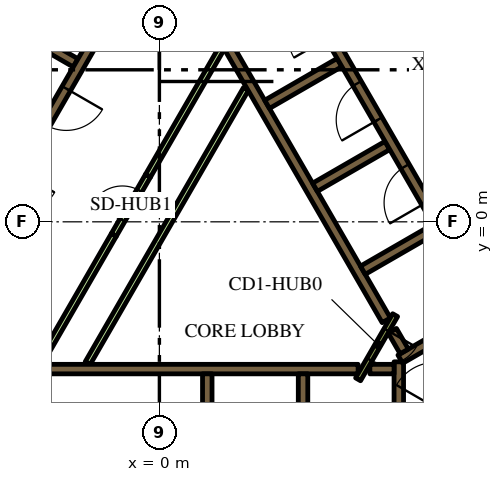
"""IFC4 building model, lengths in metres.
Left out: names, types, materials, properties, quantities, classifications, styles, units other than length and angle.
Written with IfcOpenShell. Run it as: python <this file> out.ifc"""

import sys

from ifc_helpers import new_model, si_unit, direction, frame, frame_2d, origin, place, context, subcontext, project, spatial, rectangle, extrude, element, fill, save


model = new_model("IFC4")
c1 = context("Model", 3, precision=1e-05, world=origin(), true_north=direction((0.0, 1.0)))
c2 = subcontext(c1, "Body", "Model", "MODEL_VIEW")
j1 = project(units=[si_unit("LENGTHUNIT", "METRE"), si_unit("PLANEANGLEUNIT", "RADIAN")], contexts=[c1])
p1 = place(None, origin())
s1 = spatial("IfcSite", under=j1, at=p1, CompositionType="ELEMENT")
p2 = place(p1, origin())
s2 = spatial("IfcBuilding", under=s1, at=p2, CompositionType="ELEMENT")
p3 = place(p2, frame((0.0, 0.0, 296.4)))
s3 = spatial("IfcBuildingStorey", under=s2, at=p3, CompositionType="ELEMENT", Elevation=296.4)
p4 = place(p3, frame((6.3, -7.24, 0.0), z_axis=(0.0, 0.0, 1.0), x_axis=(0.0, 1.0, 0.0)))
e1 = element("IfcWall", 1, at=p4, inside=s3, PredefinedType="SOLIDWALL", context=c2, shape_type="SweptSolid", body=[
    extrude(rectangle(XDim=3.556, YDim=0.25, at=frame_2d((1.778, 0.0))), origin(), (0.0, 0.0, 1.0), 4.2),
])
p5 = place(p3, frame((5.538, -3.875, 0.0), z_axis=(0.0, 0.0, 1.0), x_axis=(1.0, 0.0, 0.0)))
e2 = element("IfcWall", 2, at=p5, inside=s3, PredefinedType="SOLIDWALL", context=c2, shape_type="SweptSolid", body=[
    extrude(rectangle(XDim=0.637, YDim=0.25, at=frame_2d((0.318, 0.0))), origin(), (0.0, 0.0, 1.0), 4.2),
])
p6 = place(p3, frame((-5.259, -3.875, 0.0), z_axis=(0.0, 0.0, 1.0), x_axis=(1.0, 0.0, 0.0)))
e3 = element("IfcWall", 3, at=p6, inside=s3, PredefinedType="SOLIDWALL", context=c2, shape_type="SweptSolid", body=[
    extrude(rectangle(XDim=10.489, YDim=0.25, at=frame_2d((5.244, 0.0))), origin(), (0.0, 0.0, 1.0), 4.2),
])
for number, where, z_axis, x_axis in (
    (4, (1.26, -4.0, 0.0), (0.0, 0.0, 1.0), (0.0, -1.0, 0.0)),
    (5, (3.78, -4.0, 0.0), (0.0, 0.0, 1.0), (0.0, -1.0, 0.0)),
):
    element("IfcWall", number, at=place(p3, frame(where, z_axis=z_axis, x_axis=x_axis)), inside=s3, PredefinedType="SOLIDWALL", context=c2, shape_type="SweptSolid", body=[
        extrude(rectangle(XDim=2.2, YDim=0.25, at=frame_2d((1.1, 0.0))), origin(), (0.0, 0.0, 1.0), 4.2),
    ])
p7 = place(p3, frame((9.19, -1.969, 0.0), z_axis=(0.0, 0.0, 1.0), x_axis=(-0.866057109641, -0.499945079824, 0.0)))
e6 = element("IfcWall", 6, at=p7, inside=s3, PredefinedType="SOLIDWALL", context=c2, shape_type="SweptSolid", body=[
    extrude(rectangle(XDim=3.291, YDim=0.25, at=frame_2d((1.646, 0.0))), origin(), (0.0, 0.0, 1.0), 4.2),
])
p8 = place(p3, frame((6.13, -2.867, 0.0), z_axis=(0.0, 0.0, 1.0), x_axis=(0.500160776593, -0.865932559475, 0.0)))
e7 = element("IfcWall", 7, at=p8, inside=s3, PredefinedType="SOLIDWALL", context=c2, shape_type="SweptSolid", body=[
    extrude(rectangle(XDim=0.627, YDim=0.25, at=frame_2d((0.313, 0.0))), origin(), (0.0, 0.0, 1.0), 4.2),
])
p9 = place(p3, frame((5.97, -2.591, 0.0), z_axis=(0.0, 0.0, 1.0), x_axis=(-0.499994469932, 0.866028596547, 0.0)))
e8 = element("IfcWall", 8, at=p9, inside=s3, PredefinedType="SOLIDWALL", context=c2, shape_type="SweptSolid", body=[
    extrude(rectangle(XDim=10.488, YDim=0.25, at=frame_2d((5.244, 0.0))), origin(), (0.0, 0.0, 1.0), 4.2),
])
for number, where, z_axis, x_axis in (
    (9, (2.834, 3.091, 0.0), (0.0, 0.0, 1.0), (0.866, 0.5, 0.0)),
    (10, (4.094, 0.909, 0.0), (0.0, 0.0, 1.0), (0.866, 0.5, 0.0)),
    (11, (5.354, -1.274, 0.0), (0.0, 0.0, 1.0), (0.866, 0.5, 0.0)),
):
    element("IfcWall", number, at=place(p3, frame(where, z_axis=z_axis, x_axis=x_axis)), inside=s3, PredefinedType="SOLIDWALL", context=c2, shape_type="SweptSolid", body=[
        extrude(rectangle(XDim=2.2, YDim=0.25, at=frame_2d((1.1, 0.0))), origin(), (0.0, 0.0, 1.0), 4.2),
    ])
p10 = place(p3, frame((-8.06, -1.311, 0.0), z_axis=(0.0, 0.0, 1.0), x_axis=(0.50000273126, 0.866023826885, 0.0)))
e12 = element("IfcWall", 12, at=p10, inside=s3, PredefinedType="SOLIDWALL", context=c2, shape_type="SweptSolid", body=[
    extrude(rectangle(XDim=10.33, YDim=0.25, at=frame_2d((5.165, 0.0))), origin(), (0.0, 0.0, 1.0), 4.2),
])
p11 = place(p3, frame((-2.204, 4.182, 0.0), z_axis=(0.0, 0.0, 1.0), x_axis=(-0.866008176907, 0.50002983664, 0.0)))
e13 = element("IfcWall", 13, at=p11, inside=s3, PredefinedType="SOLIDWALL", context=c2, shape_type="SweptSolid", body=[
    extrude(rectangle(XDim=2.2, YDim=0.25, at=frame_2d((1.1, 0.0))), origin(), (0.0, 0.0, 1.0), 4.2),
])
p12 = place(p3, frame((-1.887, -3.718, 0.0), z_axis=(0.0, 0.0, 1.0), x_axis=(0.500005008002, 0.866022512394, 0.0)))
e14 = element("IfcWall", 14, at=p12, inside=s3, PredefinedType="PARTITIONING", context=c2, shape_type="SweptSolid", body=[
    extrude(rectangle(XDim=8.327, YDim=0.15, at=frame_2d((4.164, 0.0))), origin(), (0.0, 0.0, 1.0), 3.55),
])
p13 = place(p3, frame((-3.147, -3.718, 0.0), z_axis=(0.0, 0.0, 1.0), x_axis=(0.500010131483, 0.866019554291, 0.0)))
e15 = element("IfcWall", 15, at=p13, inside=s3, PredefinedType="PARTITIONING", context=c2, shape_type="SweptSolid", body=[
    extrude(rectangle(XDim=3.894, YDim=0.15, at=frame_2d((1.947, 0.0))), origin(), (0.0, 0.0, 1.0), 3.55),
])
p14 = place(p3, frame((-0.3, 1.212, 0.0), z_axis=(0.0, 0.0, 1.0), x_axis=(0.499963101113, 0.866046706318, 0.0)))
e16 = element("IfcWall", 16, at=p14, inside=s3, PredefinedType="PARTITIONING", context=c2, shape_type="SweptSolid", body=[
    extrude(rectangle(XDim=3.893, YDim=0.15, at=frame_2d((1.947, 0.0))), origin(), (0.0, 0.0, 1.0), 3.55),
])
p15 = place(p3, frame((8.565, -2.185, 0.0), z_axis=(0.0, 0.0, 1.0), x_axis=(-0.499997954832, 0.866026584559, 0.0)))
e17 = element("IfcWall", 17, at=p15, inside=s3, PredefinedType="SOLIDWALL", context=c2, shape_type="SweptSolid", body=[
    extrude(rectangle(XDim=12.35, YDim=0.25, at=frame_2d((6.175, 0.0))), origin(), (0.0, 0.0, 1.0), 4.2),
])
p16 = place(p15, frame((0.685, 0.0, 0.0)))
e18 = element("IfcOpeningElement", 18, at=p16, cuts=e17, PredefinedType="OPENING", context=c2, shape_type="SweptSolid", body=[
    extrude(rectangle(XDim=0.9, YDim=2.1, at=frame_2d((0.45, 1.05))), frame((0.0, 0.135, 0.0), z_axis=(0.0, -1.0, 0.0), x_axis=(1.0, 0.0, 0.0)), (0.0, 0.0, 1.0), 0.27),
])
p17 = place(p15, frame((3.105, 0.0, 0.0)))
e19 = element("IfcOpeningElement", 19, at=p17, cuts=e17, PredefinedType="OPENING", context=c2, shape_type="SweptSolid", body=[
    extrude(rectangle(XDim=1.1, YDim=2.1, at=frame_2d((0.55, 1.05))), frame((0.0, 0.135, 0.0), z_axis=(0.0, -1.0, 0.0), x_axis=(1.0, 0.0, 0.0)), (0.0, 0.0, 1.0), 0.27),
])
p18 = place(p15, frame((5.625, 0.0, 0.0)))
e20 = element("IfcOpeningElement", 20, at=p18, cuts=e17, PredefinedType="OPENING", context=c2, shape_type="SweptSolid", body=[
    extrude(rectangle(XDim=1.1, YDim=2.1, at=frame_2d((0.55, 1.05))), frame((0.0, 0.135, 0.0), z_axis=(0.0, -1.0, 0.0), x_axis=(1.0, 0.0, 0.0)), (0.0, 0.0, 1.0), 0.27),
])
p19 = place(p15, frame((8.145, 0.0, 0.0)))
e21 = element("IfcOpeningElement", 21, at=p19, cuts=e17, PredefinedType="OPENING", context=c2, shape_type="SweptSolid", body=[
    extrude(rectangle(XDim=1.1, YDim=2.1, at=frame_2d((0.55, 1.05))), frame((0.0, 0.135, 0.0), z_axis=(0.0, -1.0, 0.0), x_axis=(1.0, 0.0, 0.0)), (0.0, 0.0, 1.0), 0.27),
])
p20 = place(p15, frame((10.665, 0.0, 0.0)))
e22 = element("IfcOpeningElement", 22, at=p20, cuts=e17, PredefinedType="OPENING", context=c2, shape_type="SweptSolid", body=[
    extrude(rectangle(XDim=1.1, YDim=2.1, at=frame_2d((0.55, 1.05))), frame((0.0, 0.135, 0.0), z_axis=(0.0, -1.0, 0.0), x_axis=(1.0, 0.0, 0.0)), (0.0, 0.0, 1.0), 0.27),
])
p21 = place(p3, frame((-0.898, 6.194, 0.0), z_axis=(0.0, 0.0, 1.0), x_axis=(-0.499996202215, -0.866027596426, 0.0)))
e23 = element("IfcWall", 23, at=p21, inside=s3, PredefinedType="SOLIDWALL", context=c2, shape_type="SweptSolid", body=[
    extrude(rectangle(XDim=9.83, YDim=0.25, at=frame_2d((4.915, 0.0))), origin(), (0.0, 0.0, 1.0), 4.2),
])
p22 = place(p21, frame((0.585, 0.0, 0.0)))
e24 = element("IfcOpeningElement", 24, at=p22, cuts=e23, PredefinedType="OPENING", context=c2, shape_type="SweptSolid", body=[
    extrude(rectangle(XDim=1.1, YDim=2.1, at=frame_2d((0.55, 1.05))), frame((0.0, 0.135, 0.0), z_axis=(0.0, -1.0, 0.0), x_axis=(1.0, 0.0, 0.0)), (0.0, 0.0, 1.0), 0.27),
])
p23 = place(p21, frame((3.105, 0.0, 0.0)))
e25 = element("IfcOpeningElement", 25, at=p23, cuts=e23, PredefinedType="OPENING", context=c2, shape_type="SweptSolid", body=[
    extrude(rectangle(XDim=1.1, YDim=2.1, at=frame_2d((0.55, 1.05))), frame((0.0, 0.135, 0.0), z_axis=(0.0, -1.0, 0.0), x_axis=(1.0, 0.0, 0.0)), (0.0, 0.0, 1.0), 0.27),
])
p24 = place(p21, frame((5.625, 0.0, 0.0)))
e26 = element("IfcOpeningElement", 26, at=p24, cuts=e23, PredefinedType="OPENING", context=c2, shape_type="SweptSolid", body=[
    extrude(rectangle(XDim=1.1, YDim=2.1, at=frame_2d((0.55, 1.05))), frame((0.0, 0.135, 0.0), z_axis=(0.0, -1.0, 0.0), x_axis=(1.0, 0.0, 0.0)), (0.0, 0.0, 1.0), 0.27),
])
p25 = place(p21, frame((8.145, 0.0, 0.0)))
e27 = element("IfcOpeningElement", 27, at=p25, cuts=e23, PredefinedType="OPENING", context=c2, shape_type="SweptSolid", body=[
    extrude(rectangle(XDim=1.1, YDim=2.1, at=frame_2d((0.55, 1.05))), frame((0.0, 0.135, 0.0), z_axis=(0.0, -1.0, 0.0), x_axis=(1.0, 0.0, 0.0)), (0.0, 0.0, 1.0), 0.27),
])
p26 = place(p3, frame((7.053, -5.284, 0.0), z_axis=(0.0, 0.0, 1.0), x_axis=(0.500078061341, 0.865980330357, 0.0)))
e28 = element("IfcWall", 28, at=p26, inside=s3, PredefinedType="SOLIDWALL", context=c2, shape_type="SweptSolid", body=[
    extrude(rectangle(XDim=2.1, YDim=0.4, at=frame_2d((1.05, 0.0))), origin(), (0.0, 0.0, 1.0), 4.2),
])
p27 = place(p26, frame((0.45, 0.0, 0.0)))
e29 = element("IfcOpeningElement", 29, at=p27, cuts=e28, PredefinedType="OPENING", context=c2, shape_type="SweptSolid", body=[
    extrude(rectangle(XDim=1.2, YDim=2.1, at=frame_2d((0.6, 1.05))), frame((0.0, 0.21, 0.0), z_axis=(0.0, -1.0, 0.0), x_axis=(1.0, 0.0, 0.0)), (0.0, 0.0, 1.0), 0.42),
])
p28 = place(p3, frame((6.203, -2.456, 0.0), z_axis=(0.0, 0.0, 1.0), x_axis=(-0.500043961785, -0.866000020948, 0.0)))
e30 = element("IfcWall", 30, at=p28, inside=s3, PredefinedType="PARTITIONING", context=c2, shape_type="SweptSolid", body=[
    extrude(rectangle(XDim=1.95, YDim=0.15, at=frame_2d((0.975, 0.0))), origin(), (0.0, 0.0, 1.0), 4.2),
])
p29 = place(p28, frame((0.45, 0.0, 0.0)))
e31 = element("IfcOpeningElement", 31, at=p29, cuts=e30, PredefinedType="OPENING", context=c2, shape_type="SweptSolid", body=[
    extrude(rectangle(XDim=0.9, YDim=2.1, at=frame_2d((0.45, 1.05))), frame((0.0, 0.085, 0.0), z_axis=(0.0, -1.0, 0.0), x_axis=(1.0, 0.0, 0.0)), (0.0, 0.0, 1.0), 0.17),
])
p30 = place(p3, frame((-1.2, -0.346, 0.0), z_axis=(0.0, 0.0, 1.0), x_axis=(0.499961193289, 0.866047807691, 0.0)))
e32 = element("IfcWall", 32, at=p30, inside=s3, PredefinedType="PARTITIONING", context=c2, shape_type="SweptSolid", body=[
    extrude(rectangle(XDim=1.8, YDim=0.15, at=frame_2d((0.9, 0.0))), origin(), (0.0, 0.0, 1.0), 3.55),
])
p31 = place(p30, frame((0.45, 0.0, 0.0)))
e33 = element("IfcOpeningElement", 33, at=p31, cuts=e32, PredefinedType="OPENING", context=c2, shape_type="SweptSolid", body=[
    extrude(rectangle(XDim=0.9, YDim=2.1, at=frame_2d((0.45, 1.05))), frame((0.0, 0.085, 0.0), z_axis=(0.0, -1.0, 0.0), x_axis=(1.0, 0.0, 0.0)), (0.0, 0.0, 1.0), 0.17),
])
p32 = place(p17, origin())
e34 = element("IfcDoor", 34, at=p32, inside=s3, OperationType="DOUBLE_DOOR_SLIDING", PredefinedType="DOOR", context=c2, shape_type="SweptSolid", body=[
    extrude(rectangle(XDim=1.1, YDim=2.1, at=frame_2d((0.55, 1.05))), frame((0.0, 0.025, 0.0), z_axis=(0.0, -1.0, 0.0), x_axis=(1.0, 0.0, 0.0)), (0.0, 0.0, 1.0), 0.05),
])
fill(e19, e34)
p33 = place(p18, origin())
e35 = element("IfcDoor", 35, at=p33, inside=s3, OperationType="DOUBLE_DOOR_SLIDING", PredefinedType="DOOR", context=c2, shape_type="SweptSolid", body=[
    extrude(rectangle(XDim=1.1, YDim=2.1, at=frame_2d((0.55, 1.05))), frame((0.0, 0.025, 0.0), z_axis=(0.0, -1.0, 0.0), x_axis=(1.0, 0.0, 0.0)), (0.0, 0.0, 1.0), 0.05),
])
fill(e20, e35)
p34 = place(p23, origin())
e36 = element("IfcDoor", 36, at=p34, inside=s3, OperationType="DOUBLE_DOOR_SLIDING", PredefinedType="DOOR", context=c2, shape_type="SweptSolid", body=[
    extrude(rectangle(XDim=1.1, YDim=2.1, at=frame_2d((0.55, 1.05))), frame((0.0, 0.025, 0.0), z_axis=(0.0, -1.0, 0.0), x_axis=(1.0, 0.0, 0.0)), (0.0, 0.0, 1.0), 0.05),
])
fill(e25, e36)
p35 = place(p29, origin())
e37 = element("IfcDoor", 37, at=p35, inside=s3, OperationType="SINGLE_SWING_LEFT", PredefinedType="DOOR", context=c2, shape_type="SweptSolid", body=[
    extrude(rectangle(XDim=0.9, YDim=2.1, at=frame_2d((0.45, 1.05))), frame((0.0, 0.025, 0.0), z_axis=(0.0, -1.0, 0.0), x_axis=(1.0, 0.0, 0.0)), (0.0, 0.0, 1.0), 0.05),
])
fill(e31, e37)
p36 = place(p31, origin())
e38 = element("IfcDoor", 38, at=p36, inside=s3, OperationType="SINGLE_SWING_LEFT", PredefinedType="DOOR", context=c2, shape_type="SweptSolid", body=[
    extrude(rectangle(XDim=0.9, YDim=2.1, at=frame_2d((0.45, 1.05))), frame((0.0, 0.025, 0.0), z_axis=(0.0, -1.0, 0.0), x_axis=(1.0, 0.0, 0.0)), (0.0, 0.0, 1.0), 0.05),
])
fill(e33, e38)
save(model, sys.argv[1])
